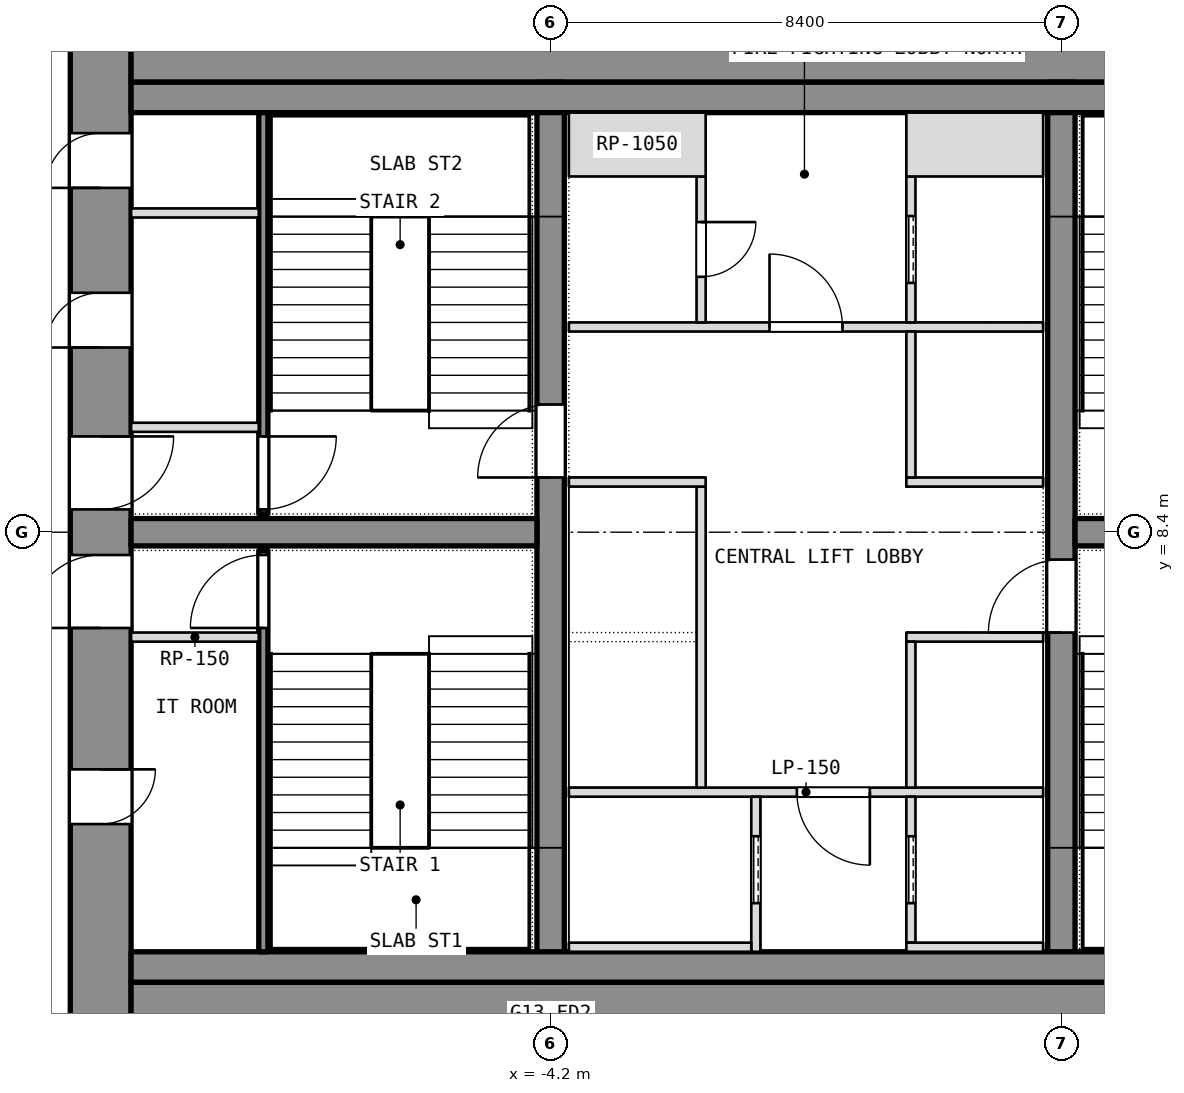
"""IFC4 building model, lengths in metres.
Left out: names, types, materials, properties, quantities, classifications, styles, units other than length and angle.
Written with IfcOpenShell. Run it as: python <this file> out.ifc"""

import sys

from ifc_helpers import new_model, si_unit, direction, frame, frame_2d, origin, place, context, subcontext, project, spatial, rectangle, extrude, element, fill, save


model = new_model("IFC4")
c1 = context("Model", 3, precision=1e-05, world=origin(), true_north=direction((0.0, 1.0)))
c2 = subcontext(c1, "Body", "Model", "MODEL_VIEW")
j1 = project(units=[si_unit("LENGTHUNIT", "METRE"), si_unit("PLANEANGLEUNIT", "RADIAN")], contexts=[c1])
p1 = place(None, origin())
s1 = spatial("IfcSite", under=j1, at=p1, CompositionType="ELEMENT")
p2 = place(p1, origin())
s2 = spatial("IfcBuilding", under=s1, at=p2, CompositionType="ELEMENT")
p3 = place(p2, frame((0.0, 0.0, 151.7)))
s3 = spatial("IfcBuildingStorey", under=s2, at=p3, CompositionType="ELEMENT", Elevation=151.7)
p4 = place(p3, frame((-11.6, 0.0, 0.0), z_axis=(0.0, 0.0, 1.0), x_axis=(0.0, 1.0, 0.0)))
e1 = element("IfcWall", 1, at=p4, inside=s3, PredefinedType="SHEAR", context=c2, shape_type="SweptSolid", body=[
    extrude(rectangle(XDim=16.8, YDim=1.0, at=frame_2d((8.4, 0.0))), origin(), (0.0, 0.0, 1.0), 3.6),
])
p5 = place(p4, frame((3.6, 0.0, 0.0)))
e2 = element("IfcOpeningElement", 2, at=p5, cuts=e1, PredefinedType="OPENING", context=c2, shape_type="SweptSolid", body=[
    extrude(rectangle(XDim=0.9, YDim=2.1, at=frame_2d((0.45, 1.05))), frame((0.0, 0.5, 0.0), z_axis=(0.0, -1.0, 0.0), x_axis=(1.0, 0.0, 0.0)), (0.0, 0.0, 1.0), 1.0),
])
p6 = place(p4, frame((6.825, 0.0, 0.0)))
e3 = element("IfcOpeningElement", 3, at=p6, cuts=e1, PredefinedType="OPENING", context=c2, shape_type="SweptSolid", body=[
    extrude(rectangle(XDim=1.2, YDim=2.1, at=frame_2d((0.6, 1.05))), frame((0.0, 0.5, 0.0), z_axis=(0.0, -1.0, 0.0), x_axis=(1.0, 0.0, 0.0)), (0.0, 0.0, 1.0), 1.0),
])
p7 = place(p4, frame((14.062, 0.0, 0.0)))
e4 = element("IfcOpeningElement", 4, at=p7, cuts=e1, PredefinedType="OPENING", context=c2, shape_type="SweptSolid", body=[
    extrude(rectangle(XDim=0.9, YDim=2.1, at=frame_2d((0.45, 1.05))), frame((0.0, 0.5, 0.0), z_axis=(0.0, -1.0, 0.0), x_axis=(1.0, 0.0, 0.0)), (0.0, 0.0, 1.0), 1.0),
])
p8 = place(p4, frame((11.438, 0.0, 0.0)))
e5 = element("IfcOpeningElement", 5, at=p8, cuts=e1, PredefinedType="OPENING", context=c2, shape_type="SweptSolid", body=[
    extrude(rectangle(XDim=0.9, YDim=2.1, at=frame_2d((0.45, 1.05))), frame((0.0, 0.5, 0.0), z_axis=(0.0, -1.0, 0.0), x_axis=(1.0, 0.0, 0.0)), (0.0, 0.0, 1.0), 1.0),
])
p9 = place(p4, frame((8.775, 0.0, 0.0)))
e6 = element("IfcOpeningElement", 6, at=p9, cuts=e1, PredefinedType="OPENING", context=c2, shape_type="SweptSolid", body=[
    extrude(rectangle(XDim=1.2, YDim=2.1, at=frame_2d((0.6, 1.05))), frame((0.0, 0.5, 0.0), z_axis=(0.0, -1.0, 0.0), x_axis=(1.0, 0.0, 0.0)), (0.0, 0.0, 1.0), 1.0),
])
for number, where, z_axis, x_axis in (
    (7, (-11.1, 0.5, 0.0), (0.0, 0.0, 1.0), (1.0, 0.0, 0.0)),
    (8, (-11.1, 16.3, 0.0), (0.0, 0.0, 1.0), (1.0, 0.0, 0.0)),
):
    element("IfcWall", number, at=place(p3, frame(where, z_axis=z_axis, x_axis=x_axis)), inside=s3, PredefinedType="SHEAR", context=c2, shape_type="SweptSolid", body=[
        extrude(rectangle(XDim=22.2, YDim=1.0, at=frame_2d((11.1, 0.0))), origin(), (0.0, 0.0, 1.0), 3.6),
    ])
p10 = place(p3, frame((-4.2, 1.0, 0.0), z_axis=(0.0, 0.0, 1.0), x_axis=(0.0, 1.0, 0.0)))
e9 = element("IfcWall", 9, at=p10, inside=s3, PredefinedType="SHEAR", context=c2, shape_type="SweptSolid", body=[
    extrude(rectangle(XDim=14.8, YDim=0.45, at=frame_2d((7.4, 0.0))), origin(), (0.0, 0.0, 1.0), 3.6),
])
p11 = place(p10, frame((8.3, 0.0, 0.0)))
e10 = element("IfcOpeningElement", 10, at=p11, cuts=e9, PredefinedType="OPENING", context=c2, shape_type="SweptSolid", body=[
    extrude(rectangle(XDim=1.2, YDim=2.1, at=frame_2d((0.6, 1.05))), frame((0.0, 0.225, 0.0), z_axis=(0.0, -1.0, 0.0), x_axis=(1.0, 0.0, 0.0)), (0.0, 0.0, 1.0), 0.45),
])
p12 = place(p3, frame((4.2, 1.0, 0.0), z_axis=(0.0, 0.0, 1.0), x_axis=(0.0, 1.0, 0.0)))
e11 = element("IfcWall", 11, at=p12, inside=s3, PredefinedType="SHEAR", context=c2, shape_type="SweptSolid", body=[
    extrude(rectangle(XDim=14.8, YDim=0.45, at=frame_2d((7.4, 0.0))), origin(), (0.0, 0.0, 1.0), 3.6),
])
p13 = place(p12, frame((5.75, 0.0, 0.0)))
e12 = element("IfcOpeningElement", 12, at=p13, cuts=e11, PredefinedType="OPENING", context=c2, shape_type="SweptSolid", body=[
    extrude(rectangle(XDim=1.2, YDim=2.1, at=frame_2d((0.6, 1.05))), frame((0.0, 0.225, 0.0), z_axis=(0.0, -1.0, 0.0), x_axis=(1.0, 0.0, 0.0)), (0.0, 0.0, 1.0), 0.45),
])
for number, where, z_axis, x_axis in (
    (13, (-11.1, 8.4, 0.0), (0.0, 0.0, 1.0), (1.0, 0.0, 0.0)),
    (14, (4.425, 8.4, 0.0), (0.0, 0.0, 1.0), (1.0, 0.0, 0.0)),
):
    element("IfcWall", number, at=place(p3, frame(where, z_axis=z_axis, x_axis=x_axis)), inside=s3, PredefinedType="SHEAR", context=c2, shape_type="SweptSolid", body=[
        extrude(rectangle(XDim=6.675, YDim=0.45, at=frame_2d((3.337, 0.0))), origin(), (0.0, 0.0, 1.0), 3.6),
    ])
for number, where, z_axis, x_axis in (
    (15, (-11.1, 1.25, 0.0), (0.0, 0.0, 1.0), (1.0, 0.0, 0.0)),
    (16, (-11.1, 15.55, 0.0), (0.0, 0.0, 1.0), (1.0, 0.0, 0.0)),
):
    element("IfcWall", number, at=place(p3, frame(where, z_axis=z_axis, x_axis=x_axis)), inside=s3, PredefinedType="PARTITIONING", context=c2, shape_type="SweptSolid", body=[
        extrude(rectangle(XDim=22.2, YDim=0.5, at=frame_2d((11.1, 0.0))), origin(), (0.0, 0.0, 1.0), 3.34),
    ])
p14 = place(p3, frame((-8.925, 1.5, 0.0), z_axis=(0.0, 0.0, 1.0), x_axis=(0.0, 1.0, 0.0)))
e17 = element("IfcWall", 17, at=p14, inside=s3, PredefinedType="SHEAR", context=c2, shape_type="SweptSolid", body=[
    extrude(rectangle(XDim=6.6, YDim=0.15, at=frame_2d((3.3, 0.0))), origin(), (0.0, 0.0, 1.0), 3.34),
])
p15 = place(p14, frame((5.325, 0.0, 0.0)))
e18 = element("IfcOpeningElement", 18, at=p15, cuts=e17, PredefinedType="OPENING", context=c2, shape_type="SweptSolid", body=[
    extrude(rectangle(XDim=1.2, YDim=2.1, at=frame_2d((0.6, 1.05))), frame((0.0, 0.075, 0.0), z_axis=(0.0, -1.0, 0.0), x_axis=(1.0, 0.0, 0.0)), (0.0, 0.0, 1.0), 0.15),
])
p16 = place(p3, frame((-11.1, 6.675, 0.0), z_axis=(0.0, 0.0, 1.0), x_axis=(1.0, 0.0, 0.0)))
e19 = element("IfcWall", 19, at=p16, inside=s3, PredefinedType="PARTITIONING", context=c2, shape_type="SweptSolid", body=[
    extrude(rectangle(XDim=2.1, YDim=0.15, at=frame_2d((1.05, 0.0))), origin(), (0.0, 0.0, 1.0), 3.34),
])
p17 = place(p3, frame((-8.925, 8.7, 0.0), z_axis=(0.0, 0.0, 1.0), x_axis=(0.0, 1.0, 0.0)))
e20 = element("IfcWall", 20, at=p17, inside=s3, PredefinedType="SHEAR", context=c2, shape_type="SweptSolid", body=[
    extrude(rectangle(XDim=6.6, YDim=0.15, at=frame_2d((3.3, 0.0))), origin(), (0.0, 0.0, 1.0), 3.34),
])
p18 = place(p17, frame((0.075, 0.0, 0.0)))
e21 = element("IfcOpeningElement", 21, at=p18, cuts=e20, PredefinedType="OPENING", context=c2, shape_type="SweptSolid", body=[
    extrude(rectangle(XDim=1.2, YDim=2.1, at=frame_2d((0.6, 1.05))), frame((0.0, 0.075, 0.0), z_axis=(0.0, -1.0, 0.0), x_axis=(1.0, 0.0, 0.0)), (0.0, 0.0, 1.0), 0.15),
])
for number, where, z_axis, x_axis in (
    (22, (-11.1, 10.125, 0.0), (0.0, 0.0, 1.0), (1.0, 0.0, 0.0)),
    (23, (-11.1, 13.65, 0.0), (0.0, 0.0, 1.0), (1.0, 0.0, 0.0)),
):
    element("IfcWall", number, at=place(p3, frame(where, z_axis=z_axis, x_axis=x_axis)), inside=s3, PredefinedType="PARTITIONING", context=c2, shape_type="SweptSolid", body=[
        extrude(rectangle(XDim=2.1, YDim=0.15, at=frame_2d((1.05, 0.0))), origin(), (0.0, 0.0, 1.0), 3.34),
    ])
p19 = place(p3, frame((-3.9, 4.125, 0.0), z_axis=(0.0, 0.0, 1.0), x_axis=(1.0, 0.0, 0.0)))
e24 = element("IfcWall", 24, at=p19, inside=s3, PredefinedType="PARTITIONING", context=c2, shape_type="SweptSolid", body=[
    extrude(rectangle(XDim=7.8, YDim=0.15, at=frame_2d((3.9, 0.0))), origin(), (0.0, 0.0, 1.0), 3.34),
])
p20 = place(p19, frame((3.75, 0.0, 0.0)))
e25 = element("IfcOpeningElement", 25, at=p20, cuts=e24, PredefinedType="OPENING", context=c2, shape_type="SweptSolid", body=[
    extrude(rectangle(XDim=1.2, YDim=2.1, at=frame_2d((0.6, 1.05))), frame((0.0, 0.075, 0.0), z_axis=(0.0, -1.0, 0.0), x_axis=(1.0, 0.0, 0.0)), (0.0, 0.0, 1.0), 0.15),
])
p21 = place(p3, frame((-3.9, 11.775, 0.0), z_axis=(0.0, 0.0, 1.0), x_axis=(1.0, 0.0, 0.0)))
e26 = element("IfcWall", 26, at=p21, inside=s3, PredefinedType="PARTITIONING", context=c2, shape_type="SweptSolid", body=[
    extrude(rectangle(XDim=7.8, YDim=0.15, at=frame_2d((3.9, 0.0))), origin(), (0.0, 0.0, 1.0), 3.34),
])
p22 = place(p21, frame((3.3, 0.0, 0.0)))
e27 = element("IfcOpeningElement", 27, at=p22, cuts=e26, PredefinedType="OPENING", context=c2, shape_type="SweptSolid", body=[
    extrude(rectangle(XDim=1.2, YDim=2.1, at=frame_2d((0.6, 1.05))), frame((0.0, 0.075, 0.0), z_axis=(0.0, -1.0, 0.0), x_axis=(1.0, 0.0, 0.0)), (0.0, 0.0, 1.0), 0.15),
])
p23 = place(p3, frame((-0.825, 1.5, 0.0), z_axis=(0.0, 0.0, 1.0), x_axis=(0.0, 1.0, 0.0)))
e28 = element("IfcWall", 28, at=p23, inside=s3, PredefinedType="SHEAR", context=c2, shape_type="SweptSolid", body=[
    extrude(rectangle(XDim=2.55, YDim=0.15, at=frame_2d((1.275, 0.0))), origin(), (0.0, 0.0, 1.0), 3.6),
])
p24 = place(p23, frame((0.8, 0.0, 0.0)))
e29 = element("IfcOpeningElement", 29, at=p24, cuts=e28, PredefinedType="OPENING", context=c2, shape_type="SweptSolid", body=[
    extrude(rectangle(XDim=1.1, YDim=2.1, at=frame_2d((0.55, 1.05))), frame((0.0, 0.075, 0.0), z_axis=(0.0, -1.0, 0.0), x_axis=(1.0, 0.0, 0.0)), (0.0, 0.0, 1.0), 0.15),
])
p25 = place(p3, frame((-3.9, 1.575, 0.0), z_axis=(0.0, 0.0, 1.0), x_axis=(1.0, 0.0, 0.0)))
e30 = element("IfcWall", 30, at=p25, inside=s3, PredefinedType="SHEAR", context=c2, shape_type="SweptSolid", body=[
    extrude(rectangle(XDim=3.0, YDim=0.15, at=frame_2d((1.5, 0.0))), origin(), (0.0, 0.0, 1.0), 3.6),
])
p26 = place(p3, frame((-1.725, 4.2, 0.0), z_axis=(0.0, 0.0, 1.0), x_axis=(0.0, 1.0, 0.0)))
e31 = element("IfcWall", 31, at=p26, inside=s3, PredefinedType="SHEAR", context=c2, shape_type="SweptSolid", body=[
    extrude(rectangle(XDim=4.95, YDim=0.15, at=frame_2d((2.475, 0.0))), origin(), (0.0, 0.0, 1.0), 3.6),
])
p27 = place(p3, frame((-3.9, 9.225, 0.0), z_axis=(0.0, 0.0, 1.0), x_axis=(1.0, 0.0, 0.0)))
e32 = element("IfcWall", 32, at=p27, inside=s3, PredefinedType="SHEAR", context=c2, shape_type="SweptSolid", body=[
    extrude(rectangle(XDim=2.25, YDim=0.15, at=frame_2d((1.125, 0.0))), origin(), (0.0, 0.0, 1.0), 3.6),
])
p28 = place(p3, frame((-1.725, 11.85, 0.0), z_axis=(0.0, 0.0, 1.0), x_axis=(0.0, 1.0, 0.0)))
e33 = element("IfcWall", 33, at=p28, inside=s3, PredefinedType="PARTITIONING", context=c2, shape_type="SweptSolid", body=[
    extrude(rectangle(XDim=2.4, YDim=0.15, at=frame_2d((1.2, 0.0))), origin(), (0.0, 0.0, 1.0), 3.34),
])
p29 = place(p28, frame((0.75, 0.0, 0.0)))
e34 = element("IfcOpeningElement", 34, at=p29, cuts=e33, PredefinedType="OPENING", context=c2, shape_type="SweptSolid", body=[
    extrude(rectangle(XDim=0.9, YDim=2.1, at=frame_2d((0.45, 1.05))), frame((0.0, 0.075, 0.0), z_axis=(0.0, -1.0, 0.0), x_axis=(1.0, 0.0, 0.0)), (0.0, 0.0, 1.0), 0.15),
])
p30 = place(p3, frame((-3.9, 14.775, 0.0), z_axis=(0.0, 0.0, 1.0), x_axis=(1.0, 0.0, 0.0)))
e35 = element("IfcWall", 35, at=p30, inside=s3, PredefinedType="PARTITIONING", context=c2, shape_type="SweptSolid", body=[
    extrude(rectangle(XDim=2.25, YDim=1.05, at=frame_2d((1.125, 0.0))), origin(), (0.0, 0.0, 1.0), 3.34),
])
p31 = place(p3, frame((1.725, 1.65, 0.0), z_axis=(0.0, 0.0, 1.0), x_axis=(0.0, 1.0, 0.0)))
e36 = element("IfcWall", 36, at=p31, inside=s3, PredefinedType="SHEAR", context=c2, shape_type="SweptSolid", body=[
    extrude(rectangle(XDim=2.4, YDim=0.15, at=frame_2d((1.2, 0.0))), origin(), (0.0, 0.0, 1.0), 3.6),
])
p32 = place(p31, frame((0.65, 0.0, 0.0)))
e37 = element("IfcOpeningElement", 37, at=p32, cuts=e36, PredefinedType="OPENING", context=c2, shape_type="SweptSolid", body=[
    extrude(rectangle(XDim=1.1, YDim=2.1, at=frame_2d((0.55, 1.05))), frame((0.0, 0.075, 0.0), z_axis=(0.0, -1.0, 0.0), x_axis=(1.0, 0.0, 0.0)), (0.0, 0.0, 1.0), 0.15),
])
p33 = place(p3, frame((1.65, 1.575, 0.0), z_axis=(0.0, 0.0, 1.0), x_axis=(1.0, 0.0, 0.0)))
e38 = element("IfcWall", 38, at=p33, inside=s3, PredefinedType="SHEAR", context=c2, shape_type="SweptSolid", body=[
    extrude(rectangle(XDim=2.25, YDim=0.15, at=frame_2d((1.125, 0.0))), origin(), (0.0, 0.0, 1.0), 3.6),
])
p34 = place(p3, frame((1.725, 11.85, 0.0), z_axis=(0.0, 0.0, 1.0), x_axis=(0.0, 1.0, 0.0)))
e39 = element("IfcWall", 39, at=p34, inside=s3, PredefinedType="SHEAR", context=c2, shape_type="SweptSolid", body=[
    extrude(rectangle(XDim=2.4, YDim=0.15, at=frame_2d((1.2, 0.0))), origin(), (0.0, 0.0, 1.0), 3.6),
])
p35 = place(p34, frame((0.65, 0.0, 0.0)))
e40 = element("IfcOpeningElement", 40, at=p35, cuts=e39, PredefinedType="OPENING", context=c2, shape_type="SweptSolid", body=[
    extrude(rectangle(XDim=1.1, YDim=2.1, at=frame_2d((0.55, 1.05))), frame((0.0, 0.075, 0.0), z_axis=(0.0, -1.0, 0.0), x_axis=(1.0, 0.0, 0.0)), (0.0, 0.0, 1.0), 0.15),
])
p36 = place(p3, frame((1.65, 14.775, 0.0), z_axis=(0.0, 0.0, 1.0), x_axis=(1.0, 0.0, 0.0)))
e41 = element("IfcWall", 41, at=p36, inside=s3, PredefinedType="SHEAR", context=c2, shape_type="SweptSolid", body=[
    extrude(rectangle(XDim=2.25, YDim=1.05, at=frame_2d((1.125, 0.0))), origin(), (0.0, 0.0, 1.0), 3.6),
])
for number, where, z_axis, x_axis in (
    (42, (1.65, 6.675, 0.0), (0.0, 0.0, 1.0), (1.0, 0.0, 0.0)),
    (43, (1.65, 9.225, 0.0), (0.0, 0.0, 1.0), (1.0, 0.0, 0.0)),
):
    element("IfcWall", number, at=place(p3, frame(where, z_axis=z_axis, x_axis=x_axis)), inside=s3, PredefinedType="SHEAR", context=c2, shape_type="SweptSolid", body=[
        extrude(rectangle(XDim=2.25, YDim=0.15, at=frame_2d((1.125, 0.0))), origin(), (0.0, 0.0, 1.0), 3.6),
    ])
p37 = place(p3, frame((1.725, 4.2, 0.0), z_axis=(0.0, 0.0, 1.0), x_axis=(0.0, 1.0, 0.0)))
e44 = element("IfcWall", 44, at=p37, inside=s3, PredefinedType="SHEAR", context=c2, shape_type="SweptSolid", body=[
    extrude(rectangle(XDim=2.4, YDim=0.15, at=frame_2d((1.2, 0.0))), origin(), (0.0, 0.0, 1.0), 3.6),
])
p38 = place(p3, frame((1.725, 9.3, 0.0), z_axis=(0.0, 0.0, 1.0), x_axis=(0.0, 1.0, 0.0)))
e45 = element("IfcWall", 45, at=p38, inside=s3, PredefinedType="SHEAR", context=c2, shape_type="SweptSolid", body=[
    extrude(rectangle(XDim=2.4, YDim=0.15, at=frame_2d((1.2, 0.0))), origin(), (0.0, 0.0, 1.0), 3.6),
])
p39 = place(p5, origin())
e46 = element("IfcDoor", 46, at=p39, inside=s3, OperationType="SINGLE_SWING_LEFT", PredefinedType="DOOR", context=c2, shape_type="SweptSolid", body=[
    extrude(rectangle(XDim=0.9, YDim=2.1, at=frame_2d((0.45, 1.05))), frame((0.0, 0.025, 0.0), z_axis=(0.0, -1.0, 0.0), x_axis=(1.0, 0.0, 0.0)), (0.0, 0.0, 1.0), 0.05),
])
fill(e2, e46)
p40 = place(p6, origin())
e47 = element("IfcDoor", 47, at=p40, inside=s3, OperationType="SINGLE_SWING_LEFT", PredefinedType="DOOR", context=c2, shape_type="SweptSolid", body=[
    extrude(rectangle(XDim=1.2, YDim=2.1, at=frame_2d((0.6, 1.05))), frame((0.0, 0.025, 0.0), z_axis=(0.0, -1.0, 0.0), x_axis=(1.0, 0.0, 0.0)), (0.0, 0.0, 1.0), 0.05),
])
fill(e3, e47)
p41 = place(p15, origin())
e48 = element("IfcDoor", 48, at=p41, inside=s3, OperationType="SINGLE_SWING_LEFT", PredefinedType="DOOR", context=c2, shape_type="SweptSolid", body=[
    extrude(rectangle(XDim=1.2, YDim=2.1, at=frame_2d((0.6, 1.05))), frame((0.0, 0.025, 0.0), z_axis=(0.0, -1.0, 0.0), x_axis=(1.0, 0.0, 0.0)), (0.0, 0.0, 1.0), 0.05),
])
fill(e18, e48)
p42 = place(p7, origin())
e49 = element("IfcDoor", 49, at=p42, inside=s3, OperationType="SINGLE_SWING_LEFT", PredefinedType="DOOR", context=c2, shape_type="SweptSolid", body=[
    extrude(rectangle(XDim=0.9, YDim=2.1, at=frame_2d((0.45, 1.05))), frame((0.0, 0.025, 0.0), z_axis=(0.0, -1.0, 0.0), x_axis=(1.0, 0.0, 0.0)), (0.0, 0.0, 1.0), 0.05),
])
fill(e4, e49)
p43 = place(p8, origin())
e50 = element("IfcDoor", 50, at=p43, inside=s3, OperationType="SINGLE_SWING_LEFT", PredefinedType="DOOR", context=c2, shape_type="SweptSolid", body=[
    extrude(rectangle(XDim=0.9, YDim=2.1, at=frame_2d((0.45, 1.05))), frame((0.0, 0.025, 0.0), z_axis=(0.0, -1.0, 0.0), x_axis=(1.0, 0.0, 0.0)), (0.0, 0.0, 1.0), 0.05),
])
fill(e5, e50)
p44 = place(p9, origin())
e51 = element("IfcDoor", 51, at=p44, inside=s3, OperationType="SINGLE_SWING_LEFT", PredefinedType="DOOR", context=c2, shape_type="SweptSolid", body=[
    extrude(rectangle(XDim=1.2, YDim=2.1, at=frame_2d((0.6, 1.05))), frame((0.0, 0.025, 0.0), z_axis=(0.0, -1.0, 0.0), x_axis=(1.0, 0.0, 0.0)), (0.0, 0.0, 1.0), 0.05),
])
fill(e6, e51)
p45 = place(p18, origin())
e52 = element("IfcDoor", 52, at=p45, inside=s3, OperationType="SINGLE_SWING_LEFT", PredefinedType="DOOR", context=c2, shape_type="SweptSolid", body=[
    extrude(rectangle(XDim=1.2, YDim=2.1, at=frame_2d((0.6, 1.05))), frame((0.0, 0.025, 0.0), z_axis=(0.0, -1.0, 0.0), x_axis=(1.0, 0.0, 0.0)), (0.0, 0.0, 1.0), 0.05),
])
fill(e21, e52)
p46 = place(p24, origin())
e53 = element("IfcDoor", 53, at=p46, inside=s3, OperationType="SLIDING_TO_LEFT", PredefinedType="DOOR", context=c2, shape_type="SweptSolid", body=[
    extrude(rectangle(XDim=1.1, YDim=2.1, at=frame_2d((0.55, 1.05))), frame((0.0, 0.025, 0.0), z_axis=(0.0, -1.0, 0.0), x_axis=(1.0, 0.0, 0.0)), (0.0, 0.0, 1.0), 0.05),
])
fill(e29, e53)
p47 = place(p32, origin())
e54 = element("IfcDoor", 54, at=p47, inside=s3, OperationType="SLIDING_TO_LEFT", PredefinedType="DOOR", context=c2, shape_type="SweptSolid", body=[
    extrude(rectangle(XDim=1.1, YDim=2.1, at=frame_2d((0.55, 1.05))), frame((0.0, 0.025, 0.0), z_axis=(0.0, -1.0, 0.0), x_axis=(1.0, 0.0, 0.0)), (0.0, 0.0, 1.0), 0.05),
])
fill(e37, e54)
p48 = place(p35, origin())
e55 = element("IfcDoor", 55, at=p48, inside=s3, OperationType="SLIDING_TO_LEFT", PredefinedType="DOOR", context=c2, shape_type="SweptSolid", body=[
    extrude(rectangle(XDim=1.1, YDim=2.1, at=frame_2d((0.55, 1.05))), frame((0.0, 0.025, 0.0), z_axis=(0.0, -1.0, 0.0), x_axis=(1.0, 0.0, 0.0)), (0.0, 0.0, 1.0), 0.05),
])
fill(e40, e55)
p49 = place(p20, origin())
e56 = element("IfcDoor", 56, at=p49, inside=s3, OperationType="SINGLE_SWING_LEFT", PredefinedType="DOOR", context=c2, shape_type="SweptSolid", body=[
    extrude(rectangle(XDim=1.2, YDim=2.1, at=frame_2d((0.6, 1.05))), frame((0.0, 0.025, 0.0), z_axis=(0.0, -1.0, 0.0), x_axis=(1.0, 0.0, 0.0)), (0.0, 0.0, 1.0), 0.05),
])
fill(e25, e56)
p50 = place(p22, origin())
e57 = element("IfcDoor", 57, at=p50, inside=s3, OperationType="SINGLE_SWING_LEFT", PredefinedType="DOOR", context=c2, shape_type="SweptSolid", body=[
    extrude(rectangle(XDim=1.2, YDim=2.1, at=frame_2d((0.6, 1.05))), frame((0.0, 0.025, 0.0), z_axis=(0.0, -1.0, 0.0), x_axis=(1.0, 0.0, 0.0)), (0.0, 0.0, 1.0), 0.05),
])
fill(e27, e57)
p51 = place(p29, origin())
e58 = element("IfcDoor", 58, at=p51, inside=s3, OperationType="SINGLE_SWING_LEFT", PredefinedType="DOOR", context=c2, shape_type="SweptSolid", body=[
    extrude(rectangle(XDim=0.9, YDim=2.1, at=frame_2d((0.45, 1.05))), frame((0.0, 0.025, 0.0), z_axis=(0.0, -1.0, 0.0), x_axis=(1.0, 0.0, 0.0)), (0.0, 0.0, 1.0), 0.05),
])
fill(e34, e58)
p52 = place(p11, origin())
e59 = element("IfcDoor", 59, at=p52, inside=s3, OperationType="SINGLE_SWING_LEFT", PredefinedType="DOOR", context=c2, shape_type="SweptSolid", body=[
    extrude(rectangle(XDim=1.2, YDim=2.1, at=frame_2d((0.6, 1.05))), frame((0.0, 0.025, 0.0), z_axis=(0.0, -1.0, 0.0), x_axis=(1.0, 0.0, 0.0)), (0.0, 0.0, 1.0), 0.05),
])
fill(e10, e59)
p53 = place(p13, origin())
e60 = element("IfcDoor", 60, at=p53, inside=s3, OperationType="SINGLE_SWING_LEFT", PredefinedType="DOOR", context=c2, shape_type="SweptSolid", body=[
    extrude(rectangle(XDim=1.2, YDim=2.1, at=frame_2d((0.6, 1.05))), frame((0.0, 0.025, 0.0), z_axis=(0.0, -1.0, 0.0), x_axis=(1.0, 0.0, 0.0)), (0.0, 0.0, 1.0), 0.05),
])
fill(e12, e60)
save(model, sys.argv[1])
